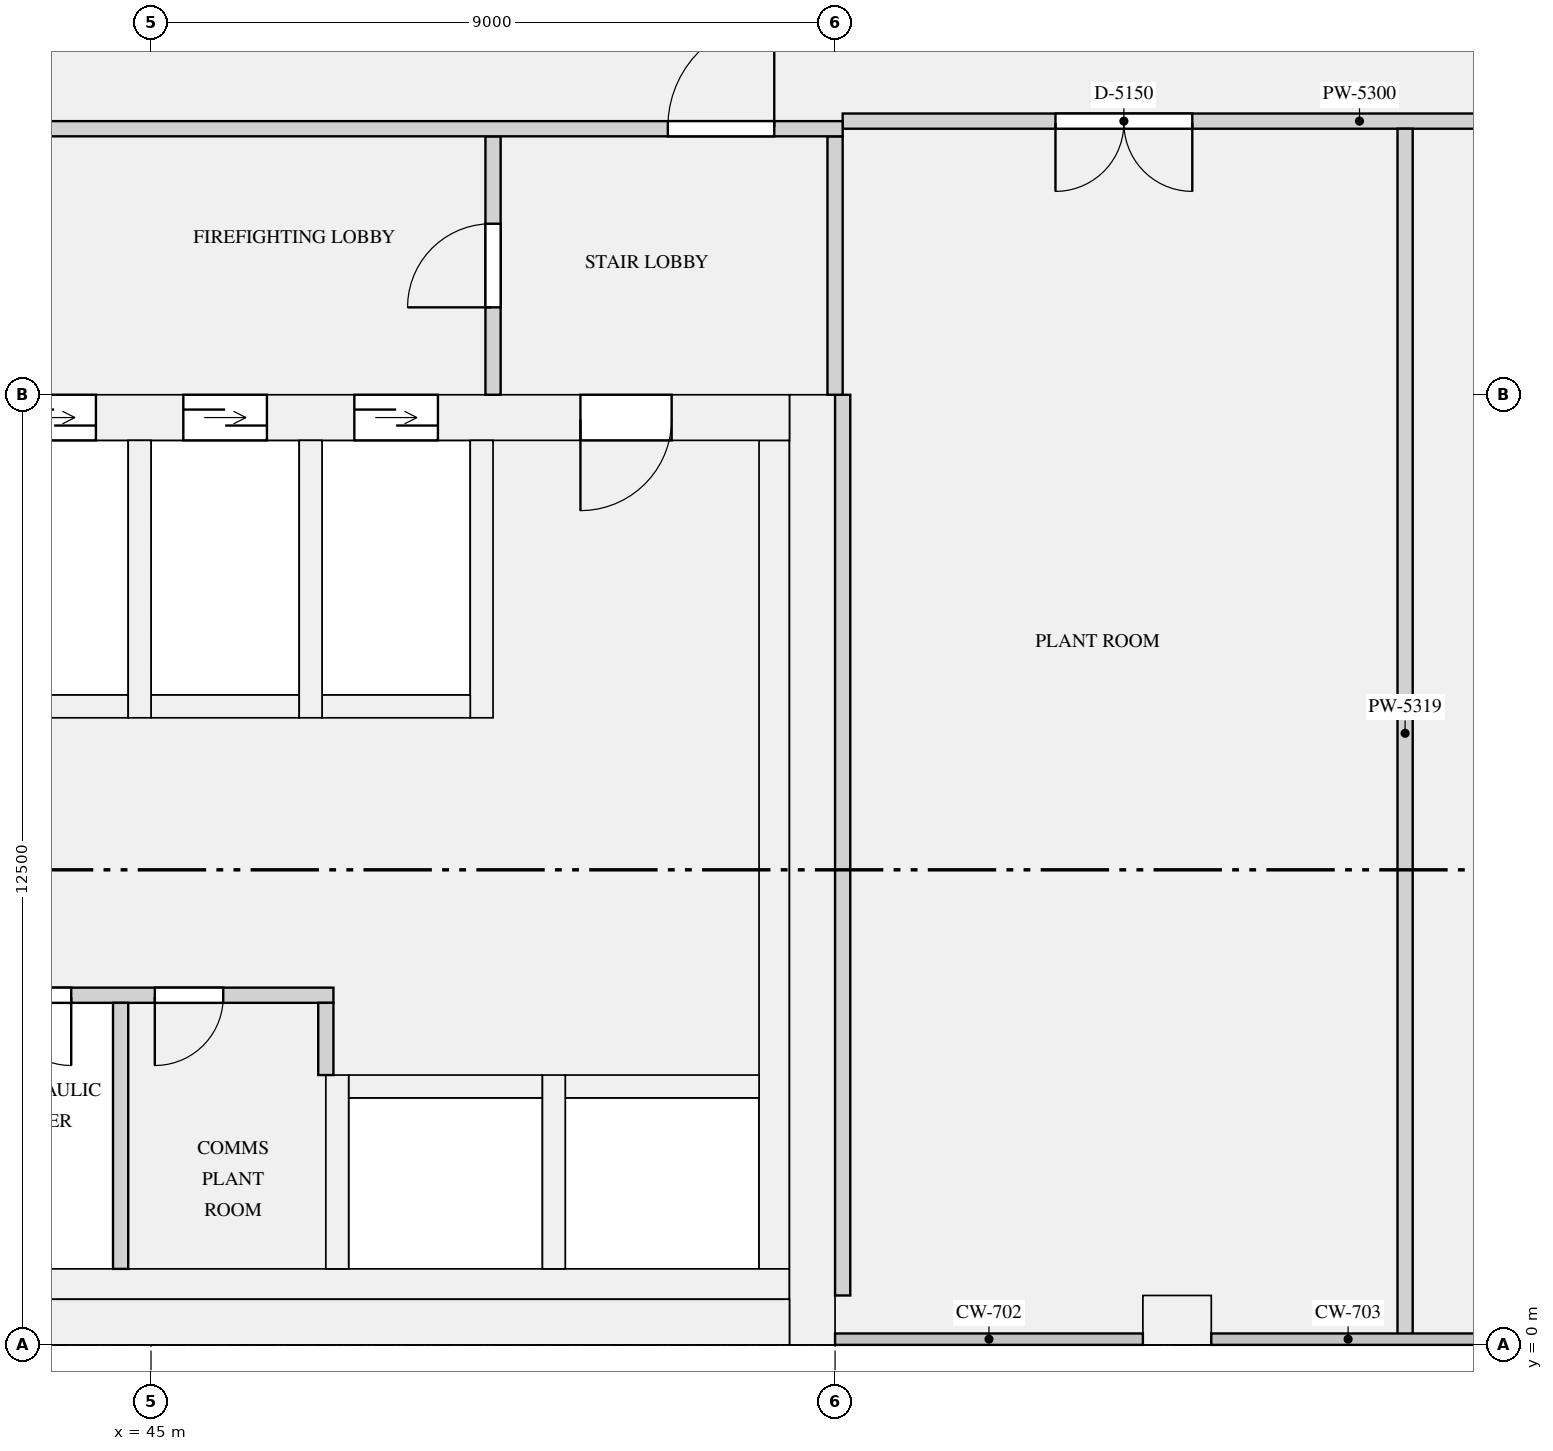
"""IFC4 building model, lengths in metres.
Left out: names, types, materials, properties, quantities, classifications, styles, units other than length and angle.
Written with IfcOpenShell. Run it as: python <this file> out.ifc"""

import sys

from ifc_helpers import new_model, si_unit, direction, frame, frame_2d, origin, origin_2d, place, context, subcontext, project, spatial, rectangle, extrude, element, fill, save


model = new_model("IFC4")
c1 = context("Model", 3, precision=1e-05, world=origin(), true_north=direction((0.0, 1.0)))
c2 = subcontext(c1, "Body", "Model", "MODEL_VIEW")
j1 = project(units=[si_unit("LENGTHUNIT", "METRE"), si_unit("PLANEANGLEUNIT", "RADIAN")], contexts=[c1])
p1 = place(None, origin())
s1 = spatial("IfcSite", under=j1, at=p1, CompositionType="ELEMENT")
p2 = place(p1, origin())
s2 = spatial("IfcBuilding", under=s1, at=p2, CompositionType="ELEMENT")
p3 = place(p2, frame((0.0, 0.0, 235.8)))
s3 = spatial("IfcBuildingStorey", under=s2, at=p3, CompositionType="ELEMENT", Elevation=235.8)
p4 = place(p3, frame((58.5, 0.325, 0.0), z_axis=(0.0, 0.0, 1.0), x_axis=(1.0, 0.0, 0.0)))
e1 = element("IfcColumn", 1, at=p4, inside=s3, PredefinedType="USERDEFINED", context=c2, shape_type="SweptSolid", body=[
    extrude(rectangle(XDim=0.9, YDim=0.65, at=origin_2d()), origin(), (0.0, 0.0, 1.0), 4.2),
])
p5 = place(p3, frame((53.7, 0.0, 0.0), z_axis=(0.0, 0.0, 1.0), x_axis=(0.0, 1.0, 0.0)))
e2 = element("IfcWall", 2, at=p5, inside=s3, PredefinedType="SHEAR", context=c2, shape_type="SweptSolid", body=[
    extrude(rectangle(XDim=12.5, YDim=0.6, at=frame_2d((6.25, 0.0))), origin(), (0.0, 0.0, 1.0), 4.2),
])
p6 = place(p3, frame((18.6, 0.3, 0.0), z_axis=(0.0, 0.0, 1.0), x_axis=(1.0, 0.0, 0.0)))
e3 = element("IfcWall", 3, at=p6, inside=s3, PredefinedType="SHEAR", context=c2, shape_type="SweptSolid", body=[
    extrude(rectangle(XDim=34.8, YDim=0.6, at=frame_2d((17.4, 0.0))), origin(), (0.0, 0.0, 1.0), 4.2),
])
p7 = place(p3, frame((18.6, 12.2, 0.0), z_axis=(0.0, 0.0, 1.0), x_axis=(1.0, 0.0, 0.0)))
e4 = element("IfcWall", 4, at=p7, inside=s3, PredefinedType="SHEAR", context=c2, shape_type="SweptSolid", body=[
    extrude(rectangle(XDim=34.8, YDim=0.6, at=frame_2d((17.4, 0.0))), origin(), (0.0, 0.0, 1.0), 4.2),
])
p8 = place(p7, frame((24.575, 0.0, 0.0)))
e5 = element("IfcOpeningElement", 5, at=p8, cuts=e4, PredefinedType="OPENING", context=c2, shape_type="SweptSolid", body=[
    extrude(rectangle(XDim=1.1, YDim=2.1, at=frame_2d((0.55, 1.05))), frame((0.0, 0.31, 0.0), z_axis=(0.0, -1.0, 0.0), x_axis=(1.0, 0.0, 0.0)), (0.0, 0.0, 1.0), 0.62),
])
p9 = place(p7, frame((26.825, 0.0, 0.0)))
e6 = element("IfcOpeningElement", 6, at=p9, cuts=e4, PredefinedType="OPENING", context=c2, shape_type="SweptSolid", body=[
    extrude(rectangle(XDim=1.1, YDim=2.1, at=frame_2d((0.55, 1.05))), frame((0.0, 0.31, 0.0), z_axis=(0.0, -1.0, 0.0), x_axis=(1.0, 0.0, 0.0)), (0.0, 0.0, 1.0), 0.62),
])
p10 = place(p7, frame((29.075, 0.0, 0.0)))
e7 = element("IfcOpeningElement", 7, at=p10, cuts=e4, PredefinedType="OPENING", context=c2, shape_type="SweptSolid", body=[
    extrude(rectangle(XDim=1.1, YDim=2.1, at=frame_2d((0.55, 1.05))), frame((0.0, 0.31, 0.0), z_axis=(0.0, -1.0, 0.0), x_axis=(1.0, 0.0, 0.0)), (0.0, 0.0, 1.0), 0.62),
])
p11 = place(p7, frame((18.6, 0.0, 0.0)))
e8 = element("IfcOpeningElement", 8, at=p11, cuts=e4, PredefinedType="OPENING", context=c2, shape_type="SweptSolid", body=[
    extrude(rectangle(XDim=0.9, YDim=2.1, at=frame_2d((0.45, 1.05))), frame((0.0, 0.31, 0.0), z_axis=(0.0, -1.0, 0.0), x_axis=(1.0, 0.0, 0.0)), (0.0, 0.0, 1.0), 0.62),
])
p12 = place(p7, frame((4.65, 0.0, 0.0)))
e9 = element("IfcOpeningElement", 9, at=p12, cuts=e4, PredefinedType="OPENING", context=c2, shape_type="SweptSolid", body=[
    extrude(rectangle(XDim=0.9, YDim=2.1, at=frame_2d((0.45, 1.05))), frame((0.0, 0.31, 0.0), z_axis=(0.0, -1.0, 0.0), x_axis=(1.0, 0.0, 0.0)), (0.0, 0.0, 1.0), 0.62),
])
p13 = place(p7, frame((1.55, 0.0, 0.0)))
e10 = element("IfcOpeningElement", 10, at=p13, cuts=e4, PredefinedType="OPENING", context=c2, shape_type="SweptSolid", body=[
    extrude(rectangle(XDim=1.2, YDim=2.1, at=frame_2d((0.6, 1.05))), frame((0.0, 0.31, 0.0), z_axis=(0.0, -1.0, 0.0), x_axis=(1.0, 0.0, 0.0)), (0.0, 0.0, 1.0), 0.62),
])
p14 = place(p7, frame((32.05, 0.0, 0.0)))
e11 = element("IfcOpeningElement", 11, at=p14, cuts=e4, PredefinedType="OPENING", context=c2, shape_type="SweptSolid", body=[
    extrude(rectangle(XDim=1.2, YDim=2.1, at=frame_2d((0.6, 1.05))), frame((0.0, 0.31, 0.0), z_axis=(0.0, -1.0, 0.0), x_axis=(1.0, 0.0, 0.0)), (0.0, 0.0, 1.0), 0.62),
])
p15 = place(p3, frame((53.2, 1.0, 0.0), z_axis=(0.0, 0.0, 1.0), x_axis=(0.0, 1.0, 0.0)))
e12 = element("IfcWall", 12, at=p15, inside=s3, PredefinedType="SHEAR", context=c2, shape_type="SweptSolid", body=[
    extrude(rectangle(XDim=10.9, YDim=0.4, at=frame_2d((5.45, 0.0))), origin(), (0.0, 0.0, 1.0), 4.2),
])
p16 = place(p3, frame((18.6, 0.8, 0.0), z_axis=(0.0, 0.0, 1.0), x_axis=(1.0, 0.0, 0.0)))
e13 = element("IfcWall", 13, at=p16, inside=s3, PredefinedType="SHEAR", context=c2, shape_type="SweptSolid", body=[
    extrude(rectangle(XDim=34.8, YDim=0.4, at=frame_2d((17.4, 0.0))), origin(), (0.0, 0.0, 1.0), 4.2),
])
for number, where, z_axis, x_axis in (
    (14, (42.75, 8.4, 0.0), (0.0, 0.0, 1.0), (1.0, 0.0, 0.0)),
    (15, (45.0, 8.4, 0.0), (0.0, 0.0, 1.0), (1.0, 0.0, 0.0)),
):
    element("IfcWall", number, at=place(p3, frame(where, z_axis=z_axis, x_axis=x_axis)), inside=s3, PredefinedType="SHEAR", context=c2, shape_type="SweptSolid", body=[
        extrude(rectangle(XDim=1.95, YDim=0.3, at=frame_2d((0.975, 0.0))), origin(), (0.0, 0.0, 1.0), 4.2),
    ])
p17 = place(p3, frame((44.85, 8.25, 0.0), z_axis=(0.0, 0.0, 1.0), x_axis=(0.0, 1.0, 0.0)))
e16 = element("IfcWall", 16, at=p17, inside=s3, PredefinedType="SHEAR", context=c2, shape_type="SweptSolid", body=[
    extrude(rectangle(XDim=3.65, YDim=0.3, at=frame_2d((1.825, 0.0))), origin(), (0.0, 0.0, 1.0), 4.2),
])
p18 = place(p3, frame((47.25, 8.4, 0.0), z_axis=(0.0, 0.0, 1.0), x_axis=(1.0, 0.0, 0.0)))
e17 = element("IfcWall", 17, at=p18, inside=s3, PredefinedType="SHEAR", context=c2, shape_type="SweptSolid", body=[
    extrude(rectangle(XDim=1.95, YDim=0.3, at=frame_2d((0.975, 0.0))), origin(), (0.0, 0.0, 1.0), 4.2),
])
for number, where, z_axis, x_axis in (
    (18, (47.1, 8.25, 0.0), (0.0, 0.0, 1.0), (0.0, 1.0, 0.0)),
    (19, (49.35, 8.25, 0.0), (0.0, 0.0, 1.0), (0.0, 1.0, 0.0)),
):
    element("IfcWall", number, at=place(p3, frame(where, z_axis=z_axis, x_axis=x_axis)), inside=s3, PredefinedType="SHEAR", context=c2, shape_type="SweptSolid", body=[
        extrude(rectangle(XDim=3.65, YDim=0.3, at=frame_2d((1.825, 0.0))), origin(), (0.0, 0.0, 1.0), 4.2),
    ])
p19 = place(p3, frame((47.6, 3.4, 0.0), z_axis=(0.0, 0.0, 1.0), x_axis=(1.0, 0.0, 0.0)))
e20 = element("IfcWall", 20, at=p19, inside=s3, PredefinedType="SHEAR", context=c2, shape_type="SweptSolid", body=[
    extrude(rectangle(XDim=2.55, YDim=0.3, at=frame_2d((1.275, 0.0))), origin(), (0.0, 0.0, 1.0), 4.2),
])
for number, where, z_axis, x_axis in (
    (21, (47.45, 1.0, 0.0), (0.0, 0.0, 1.0), (0.0, 1.0, 0.0)),
    (22, (50.45, 3.4, 0.0), (0.0, 0.0, 1.0), (1.0, 0.0, 0.0)),
    (23, (50.3, 1.0, 0.0), (0.0, 0.0, 1.0), (0.0, 1.0, 0.0)),
):
    element("IfcWall", number, at=place(p3, frame(where, z_axis=z_axis, x_axis=x_axis)), inside=s3, PredefinedType="SHEAR", context=c2, shape_type="SweptSolid", body=[
        extrude(rectangle(XDim=2.55, YDim=0.3, at=frame_2d((1.275, 0.0))), origin(), (0.0, 0.0, 1.0), 4.2),
    ])
p20 = place(p3, frame((40.2, 4.6, 0.0), z_axis=(0.0, 0.0, 1.0), x_axis=(1.0, 0.0, 0.0)))
e24 = element("IfcWall", 24, at=p20, inside=s3, PredefinedType="PARTITIONING", context=c2, shape_type="SweptSolid", body=[
    extrude(rectangle(XDim=7.2, YDim=0.2, at=frame_2d((3.6, 0.0))), origin(), (0.0, 0.0, 1.0), 3.85),
])
p21 = place(p20, frame((4.85, 0.0, 0.0)))
e25 = element("IfcOpeningElement", 25, at=p21, cuts=e24, PredefinedType="OPENING", context=c2, shape_type="SweptSolid", body=[
    extrude(rectangle(XDim=0.9, YDim=2.1, at=frame_2d((0.45, 1.05))), frame((0.0, 0.11, 0.0), z_axis=(0.0, -1.0, 0.0), x_axis=(1.0, 0.0, 0.0)), (0.0, 0.0, 1.0), 0.22),
])
p22 = place(p20, frame((0.65, 0.0, 0.0)))
e26 = element("IfcOpeningElement", 26, at=p22, cuts=e24, PredefinedType="OPENING", context=c2, shape_type="SweptSolid", body=[
    extrude(rectangle(XDim=0.9, YDim=2.1, at=frame_2d((0.45, 1.05))), frame((0.0, 0.11, 0.0), z_axis=(0.0, -1.0, 0.0), x_axis=(1.0, 0.0, 0.0)), (0.0, 0.0, 1.0), 0.22),
])
p23 = place(p20, frame((2.85, 0.0, 0.0)))
e27 = element("IfcOpeningElement", 27, at=p23, cuts=e24, PredefinedType="OPENING", context=c2, shape_type="SweptSolid", body=[
    extrude(rectangle(XDim=0.9, YDim=2.1, at=frame_2d((0.45, 1.05))), frame((0.0, 0.11, 0.0), z_axis=(0.0, -1.0, 0.0), x_axis=(1.0, 0.0, 0.0)), (0.0, 0.0, 1.0), 0.22),
])
p24 = place(p3, frame((44.6, 1.0, 0.0), z_axis=(0.0, 0.0, 1.0), x_axis=(0.0, 1.0, 0.0)))
e28 = element("IfcWall", 28, at=p24, inside=s3, PredefinedType="PARTITIONING", context=c2, shape_type="SweptSolid", body=[
    extrude(rectangle(XDim=3.5, YDim=0.2, at=frame_2d((1.75, 0.0))), origin(), (0.0, 0.0, 1.0), 3.85),
])
p25 = place(p3, frame((47.3, 3.55, 0.0), z_axis=(0.0, 0.0, 1.0), x_axis=(0.0, 1.0, 0.0)))
e29 = element("IfcWall", 29, at=p25, inside=s3, PredefinedType="PARTITIONING", context=c2, shape_type="SweptSolid", body=[
    extrude(rectangle(XDim=0.95, YDim=0.2, at=frame_2d((0.475, 0.0))), origin(), (0.0, 0.0, 1.0), 3.85),
])
p26 = place(p3, frame((49.5, 12.5, 0.0), z_axis=(0.0, 0.0, 1.0), x_axis=(0.0, 1.0, 0.0)))
e30 = element("IfcWall", 30, at=p26, inside=s3, PredefinedType="PARTITIONING", context=c2, shape_type="SweptSolid", body=[
    extrude(rectangle(XDim=3.4, YDim=0.2, at=frame_2d((1.7, 0.0))), origin(), (0.0, 0.0, 1.0), 3.85),
])
p27 = place(p26, frame((1.15, 0.0, 0.0)))
e31 = element("IfcOpeningElement", 31, at=p27, cuts=e30, PredefinedType="OPENING", context=c2, shape_type="SweptSolid", body=[
    extrude(rectangle(XDim=1.1, YDim=2.1, at=frame_2d((0.55, 1.05))), frame((0.0, 0.11, 0.0), z_axis=(0.0, -1.0, 0.0), x_axis=(1.0, 0.0, 0.0)), (0.0, 0.0, 1.0), 0.22),
])
p28 = place(p3, frame((54.0, 12.5, 0.0), z_axis=(0.0, 0.0, 1.0), x_axis=(0.0, 1.0, 0.0)))
e32 = element("IfcWall", 32, at=p28, inside=s3, PredefinedType="PARTITIONING", context=c2, shape_type="SweptSolid", body=[
    extrude(rectangle(XDim=3.4, YDim=0.2, at=frame_2d((1.7, 0.0))), origin(), (0.0, 0.0, 1.0), 3.85),
])
p29 = place(p3, frame((17.9, 16.0, 0.0), z_axis=(0.0, 0.0, 1.0), x_axis=(1.0, 0.0, 0.0)))
e33 = element("IfcWall", 33, at=p29, inside=s3, PredefinedType="PARTITIONING", context=c2, shape_type="SweptSolid", body=[
    extrude(rectangle(XDim=36.2, YDim=0.2, at=frame_2d((18.1, 0.0))), origin(), (0.0, 0.0, 1.0), 3.85),
])
p30 = place(p29, frame((0.9, 0.0, 0.0)))
e34 = element("IfcOpeningElement", 34, at=p30, cuts=e33, PredefinedType="OPENING", context=c2, shape_type="SweptSolid", body=[
    extrude(rectangle(XDim=1.4, YDim=2.1, at=frame_2d((0.7, 1.05))), frame((0.0, 0.11, 0.0), z_axis=(0.0, -1.0, 0.0), x_axis=(1.0, 0.0, 0.0)), (0.0, 0.0, 1.0), 0.22),
])
p31 = place(p29, frame((33.9, 0.0, 0.0)))
e35 = element("IfcOpeningElement", 35, at=p31, cuts=e33, PredefinedType="OPENING", context=c2, shape_type="SweptSolid", body=[
    extrude(rectangle(XDim=1.4, YDim=2.1, at=frame_2d((0.7, 1.05))), frame((0.0, 0.11, 0.0), z_axis=(0.0, -1.0, 0.0), x_axis=(1.0, 0.0, 0.0)), (0.0, 0.0, 1.0), 0.22),
])
p32 = place(p3, frame((54.1, 16.1, 0.0), z_axis=(0.0, 0.0, 1.0), x_axis=(1.0, 0.0, 0.0)))
e36 = element("IfcWall", 36, at=p32, inside=s3, PredefinedType="PARTITIONING", context=c2, shape_type="SweptSolid", body=[
    extrude(rectangle(XDim=14.75, YDim=0.2, at=frame_2d((7.375, 0.0))), origin(), (0.0, 0.0, 1.0), 3.85),
])
p33 = place(p32, frame((2.8, 0.0, 0.0)))
e37 = element("IfcOpeningElement", 37, at=p33, cuts=e36, PredefinedType="OPENING", context=c2, shape_type="SweptSolid", body=[
    extrude(rectangle(XDim=1.8, YDim=2.1, at=frame_2d((0.9, 1.05))), frame((0.0, 0.11, 0.0), z_axis=(0.0, -1.0, 0.0), x_axis=(1.0, 0.0, 0.0)), (0.0, 0.0, 1.0), 0.22),
])
p34 = place(p32, frame((9.0, 0.0, 0.0)))
e38 = element("IfcOpeningElement", 38, at=p34, cuts=e36, PredefinedType="OPENING", context=c2, shape_type="SweptSolid", body=[
    extrude(rectangle(XDim=1.8, YDim=2.1, at=frame_2d((0.9, 1.05))), frame((0.0, 0.11, 0.0), z_axis=(0.0, -1.0, 0.0), x_axis=(1.0, 0.0, 0.0)), (0.0, 0.0, 1.0), 0.22),
])
p35 = place(p32, frame((13.075, 0.0, 0.0)))
e39 = element("IfcOpeningElement", 39, at=p35, cuts=e36, PredefinedType="OPENING", context=c2, shape_type="SweptSolid", body=[
    extrude(rectangle(XDim=1.0, YDim=2.1, at=frame_2d((0.5, 1.05))), frame((0.0, 0.11, 0.0), z_axis=(0.0, -1.0, 0.0), x_axis=(1.0, 0.0, 0.0)), (0.0, 0.0, 1.0), 0.22),
])
p36 = place(p3, frame((54.1, 0.65, 0.0), z_axis=(0.0, 0.0, 1.0), x_axis=(0.0, 1.0, 0.0)))
e40 = element("IfcWall", 40, at=p36, inside=s3, PredefinedType="PARTITIONING", context=c2, shape_type="SweptSolid", body=[
    extrude(rectangle(XDim=11.85, YDim=0.2, at=frame_2d((5.925, 0.0))), origin(), (0.0, 0.0, 1.0), 3.85),
])
p37 = place(p3, frame((61.5, 0.093, 0.0), z_axis=(0.0, 0.0, 1.0), x_axis=(0.0, 1.0, 0.0)))
e41 = element("IfcWall", 41, at=p37, inside=s3, PredefinedType="PARTITIONING", context=c2, shape_type="SweptSolid", body=[
    extrude(rectangle(XDim=15.907, YDim=0.2, at=frame_2d((7.954, 0.0))), origin(), (0.0, 0.0, 1.0), 3.85),
])
p38 = place(p8, origin())
e42 = element("IfcDoor", 42, at=p38, inside=s3, OperationType="DOUBLE_DOOR_SLIDING", PredefinedType="DOOR", context=c2, shape_type="SweptSolid", body=[
    extrude(rectangle(XDim=1.1, YDim=2.1, at=frame_2d((0.55, 1.05))), frame((0.0, 0.025, 0.0), z_axis=(0.0, -1.0, 0.0), x_axis=(1.0, 0.0, 0.0)), (0.0, 0.0, 1.0), 0.05),
])
fill(e5, e42)
p39 = place(p9, origin())
e43 = element("IfcDoor", 43, at=p39, inside=s3, OperationType="DOUBLE_DOOR_SLIDING", PredefinedType="DOOR", context=c2, shape_type="SweptSolid", body=[
    extrude(rectangle(XDim=1.1, YDim=2.1, at=frame_2d((0.55, 1.05))), frame((0.0, 0.025, 0.0), z_axis=(0.0, -1.0, 0.0), x_axis=(1.0, 0.0, 0.0)), (0.0, 0.0, 1.0), 0.05),
])
fill(e6, e43)
p40 = place(p10, origin())
e44 = element("IfcDoor", 44, at=p40, inside=s3, OperationType="DOUBLE_DOOR_SLIDING", PredefinedType="DOOR", context=c2, shape_type="SweptSolid", body=[
    extrude(rectangle(XDim=1.1, YDim=2.1, at=frame_2d((0.55, 1.05))), frame((0.0, 0.025, 0.0), z_axis=(0.0, -1.0, 0.0), x_axis=(1.0, 0.0, 0.0)), (0.0, 0.0, 1.0), 0.05),
])
fill(e7, e44)
p41 = place(p21, frame((0.9, 0.0, 0.0), z_axis=(0.0, 0.0, 1.0), x_axis=(-1.0, 0.0, 0.0)))
e45 = element("IfcDoor", 45, at=p41, inside=s3, OperationType="SINGLE_SWING_RIGHT", PredefinedType="DOOR", context=c2, shape_type="SweptSolid", body=[
    extrude(rectangle(XDim=0.9, YDim=2.1, at=frame_2d((0.45, 1.05))), frame((0.0, 0.025, 0.0), z_axis=(0.0, -1.0, 0.0), x_axis=(1.0, 0.0, 0.0)), (0.0, 0.0, 1.0), 0.05),
])
fill(e25, e45)
p42 = place(p23, frame((0.9, 0.0, 0.0), z_axis=(0.0, 0.0, 1.0), x_axis=(-1.0, 0.0, 0.0)))
e46 = element("IfcDoor", 46, at=p42, inside=s3, OperationType="SINGLE_SWING_LEFT", PredefinedType="DOOR", context=c2, shape_type="SweptSolid", body=[
    extrude(rectangle(XDim=0.9, YDim=2.1, at=frame_2d((0.45, 1.05))), frame((0.0, 0.025, 0.0), z_axis=(0.0, -1.0, 0.0), x_axis=(1.0, 0.0, 0.0)), (0.0, 0.0, 1.0), 0.05),
])
fill(e27, e46)
p43 = place(p14, frame((1.2, 0.0, 0.0), z_axis=(0.0, 0.0, 1.0), x_axis=(-1.0, 0.0, 0.0)))
e47 = element("IfcDoor", 47, at=p43, inside=s3, OperationType="SINGLE_SWING_RIGHT", PredefinedType="DOOR", context=c2, shape_type="SweptSolid", body=[
    extrude(rectangle(XDim=1.2, YDim=2.1, at=frame_2d((0.6, 1.05))), frame((0.0, 0.025, 0.0), z_axis=(0.0, -1.0, 0.0), x_axis=(1.0, 0.0, 0.0)), (0.0, 0.0, 1.0), 0.05),
])
fill(e11, e47)
p44 = place(p27, origin())
e48 = element("IfcDoor", 48, at=p44, inside=s3, OperationType="SINGLE_SWING_LEFT", PredefinedType="DOOR", context=c2, shape_type="SweptSolid", body=[
    extrude(rectangle(XDim=1.1, YDim=2.1, at=frame_2d((0.55, 1.05))), frame((0.0, 0.025, 0.0), z_axis=(0.0, -1.0, 0.0), x_axis=(1.0, 0.0, 0.0)), (0.0, 0.0, 1.0), 0.05),
])
fill(e31, e48)
p45 = place(p31, origin())
e49 = element("IfcDoor", 49, at=p45, inside=s3, OperationType="SINGLE_SWING_RIGHT", PredefinedType="DOOR", context=c2, shape_type="SweptSolid", body=[
    extrude(rectangle(XDim=1.4, YDim=2.1, at=frame_2d((0.7, 1.05))), frame((0.0, 0.025, 0.0), z_axis=(0.0, -1.0, 0.0), x_axis=(1.0, 0.0, 0.0)), (0.0, 0.0, 1.0), 0.05),
])
fill(e35, e49)
p46 = place(p33, frame((1.8, 0.0, 0.0), z_axis=(0.0, 0.0, 1.0), x_axis=(-1.0, 0.0, 0.0)))
e50 = element("IfcDoor", 50, at=p46, inside=s3, OperationType="DOUBLE_DOOR_SINGLE_SWING", PredefinedType="DOOR", context=c2, shape_type="SweptSolid", body=[
    extrude(rectangle(XDim=1.8, YDim=2.1, at=frame_2d((0.9, 1.05))), frame((0.0, 0.025, 0.0), z_axis=(0.0, -1.0, 0.0), x_axis=(1.0, 0.0, 0.0)), (0.0, 0.0, 1.0), 0.05),
])
fill(e37, e50)
save(model, sys.argv[1])
